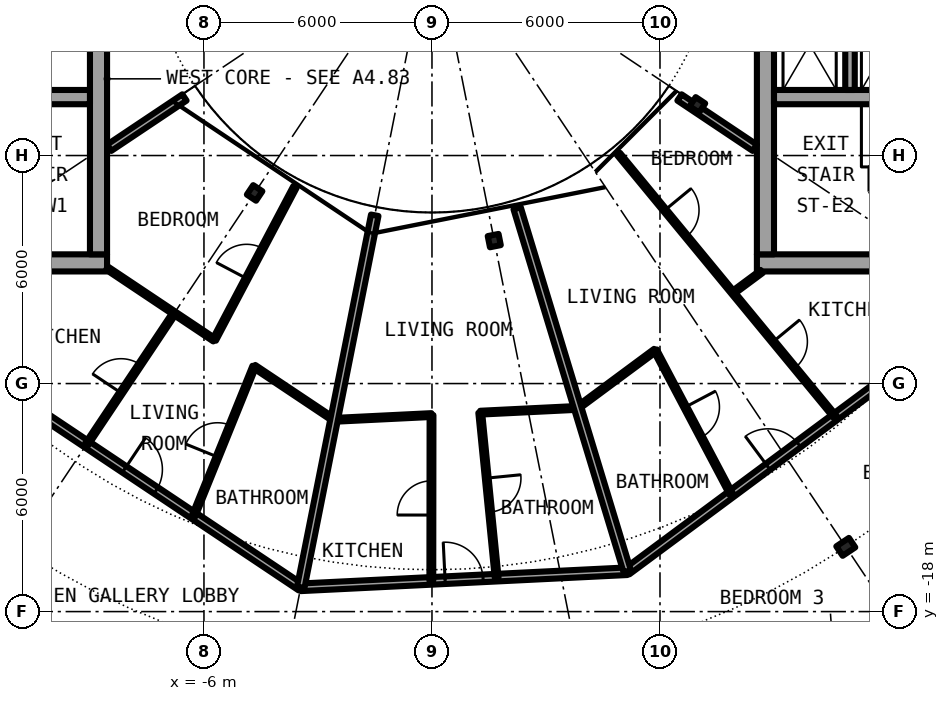
"""IFC4 building model, lengths in metres.
Left out: names, types, materials, properties, quantities, classifications, styles, units other than length and angle.
Written with IfcOpenShell. Run it as: python <this file> out.ifc"""

import sys

from ifc_helpers import new_model, si_unit, direction, frame, frame_2d, origin, origin_2d, place, context, subcontext, project, spatial, rectangle, i_section, extrude, element, fill, save


model = new_model("IFC4")
c1 = context("Model", 3, precision=1e-05, world=origin(), true_north=direction((0.0, 1.0)))
c2 = subcontext(c1, "Body", "Model", "MODEL_VIEW")
j1 = project(units=[si_unit("LENGTHUNIT", "METRE"), si_unit("PLANEANGLEUNIT", "RADIAN")], contexts=[c1])
p1 = place(None, origin())
s1 = spatial("IfcSite", under=j1, at=p1, CompositionType="ELEMENT")
p2 = place(p1, origin())
s2 = spatial("IfcBuilding", under=s1, at=p2, CompositionType="ELEMENT")
p3 = place(p2, frame((0.0, 0.0, 190.2)))
s3 = spatial("IfcBuildingStorey", under=s2, at=p3, CompositionType="ELEMENT", Elevation=190.2)
p4 = place(p3, frame((10.889, -16.297, 0.0), z_axis=(0.0, 0.0, 1.0), x_axis=(0.55557023302, -0.831469612303, 0.0)))
e1 = element("IfcColumn", 1, at=p4, inside=s3, PredefinedType="COLUMN", context=c2, shape_type="SweptSolid", body=[
    extrude(i_section(OverallWidth=0.3, OverallDepth=0.4, WebThickness=0.013, FlangeThickness=0.024, FilletRadius=0.027, at=origin_2d()), origin(), (0.0, 0.0, 1.0), 3.05),
])
for number, where, z_axis, x_axis in (
    (2, (-4.667, -6.984, 0.0), (0.0, 0.0, 1.0), (-0.556, -0.831, 0.0)),
    (3, (1.639, -8.239, 0.0), (0.0, 0.0, 1.0), (0.195, -0.981, 0.0)),
    (4, (6.984, -4.667, 0.0), (0.0, 0.0, 1.0), (0.831, -0.556, 0.0)),
):
    element("IfcColumn", number, at=place(p3, frame(where, z_axis=z_axis, x_axis=x_axis)), inside=s3, PredefinedType="COLUMN", context=c2, shape_type="SweptSolid", body=[
        extrude(i_section(OverallWidth=0.3, OverallDepth=0.29, WebThickness=0.009, FlangeThickness=0.014, FilletRadius=0.027, at=origin_2d()), origin(), (0.0, 0.0, 1.0), 3.05),
    ])
p5 = place(p3, frame((8.55, -8.825, 0.0), z_axis=(0.0, 0.0, 1.0), x_axis=(1.0, 0.0, 0.0)))
e5 = element("IfcWall", 5, at=p5, inside=s3, PredefinedType="SHEAR", context=c2, shape_type="SweptSolid", body=[
    extrude(rectangle(XDim=13.5, YDim=0.45, at=frame_2d((6.75, 0.0))), origin(), (0.0, 0.0, 1.0), 3.05),
])
p6 = place(p5, frame((11.325, 0.0, 0.0)))
e6 = element("IfcOpeningElement", 6, at=p6, cuts=e5, PredefinedType="OPENING", context=c2, shape_type="SweptSolid", body=[
    extrude(rectangle(XDim=1.2, YDim=2.3, at=frame_2d((0.6, 1.15))), frame((0.0, 0.235, 0.0), z_axis=(0.0, -1.0, 0.0), x_axis=(1.0, 0.0, 0.0)), (0.0, 0.0, 1.0), 0.47),
])
p7 = place(p3, frame((8.775, -8.6, 0.0), z_axis=(0.0, 0.0, 1.0), x_axis=(0.0, 1.0, 0.0)))
e7 = element("IfcWall", 7, at=p7, inside=s3, PredefinedType="SHEAR", context=c2, shape_type="SweptSolid", body=[
    extrude(rectangle(XDim=17.2, YDim=0.45, at=frame_2d((8.6, 0.0))), origin(), (0.0, 0.0, 1.0), 3.05),
])
p8 = place(p7, frame((7.4, 0.0, 0.1)))
e8 = element("IfcOpeningElement", 8, at=p8, cuts=e7, PredefinedType="OPENING", context=c2, shape_type="SweptSolid", body=[
    extrude(rectangle(XDim=2.4, YDim=2.2, at=frame_2d((1.2, 1.1))), frame((0.0, 0.235, 0.0), z_axis=(0.0, -1.0, 0.0), x_axis=(1.0, 0.0, 0.0)), (0.0, 0.0, 1.0), 0.47),
])
p9 = place(p3, frame((9.0, -4.462, 0.0), z_axis=(0.0, 0.0, 1.0), x_axis=(1.0, 0.0, 0.0)))
e9 = element("IfcWall", 9, at=p9, inside=s3, PredefinedType="SHEAR", context=c2, shape_type="SweptSolid", body=[
    extrude(rectangle(XDim=10.15, YDim=0.375, at=frame_2d((5.075, 0.0))), origin(), (0.0, 0.0, 1.0), 3.05),
])
p10 = place(p3, frame((11.0, -1.825, 0.0), z_axis=(0.0, 0.0, 1.0), x_axis=(0.0, -1.0, 0.0)))
e10 = element("IfcWall", 10, at=p10, inside=s3, PredefinedType="SOLIDWALL", context=c2, shape_type="SweptSolid", body=[
    extrude(rectangle(XDim=2.45, YDim=0.25, at=frame_2d((1.225, 0.0))), origin(), (0.0, 0.0, 1.0), 2.7),
])
p11 = place(p3, frame((-22.05, -8.825, 0.0), z_axis=(0.0, 0.0, 1.0), x_axis=(1.0, 0.0, 0.0)))
e11 = element("IfcWall", 11, at=p11, inside=s3, PredefinedType="SHEAR", context=c2, shape_type="SweptSolid", body=[
    extrude(rectangle(XDim=13.5, YDim=0.45, at=frame_2d((6.75, 0.0))), origin(), (0.0, 0.0, 1.0), 3.05),
])
p12 = place(p11, frame((0.975, 0.0, 0.0)))
e12 = element("IfcOpeningElement", 12, at=p12, cuts=e11, PredefinedType="OPENING", context=c2, shape_type="SweptSolid", body=[
    extrude(rectangle(XDim=1.2, YDim=2.3, at=frame_2d((0.6, 1.15))), frame((0.0, 0.235, 0.0), z_axis=(0.0, -1.0, 0.0), x_axis=(1.0, 0.0, 0.0)), (0.0, 0.0, 1.0), 0.47),
])
p13 = place(p3, frame((-8.775, 8.6, 0.0), z_axis=(0.0, 0.0, 1.0), x_axis=(0.0, -1.0, 0.0)))
e13 = element("IfcWall", 13, at=p13, inside=s3, PredefinedType="SHEAR", context=c2, shape_type="SweptSolid", body=[
    extrude(rectangle(XDim=17.2, YDim=0.45, at=frame_2d((8.6, 0.0))), origin(), (0.0, 0.0, 1.0), 3.05),
])
p14 = place(p13, frame((7.4, 0.0, 0.1)))
e14 = element("IfcOpeningElement", 14, at=p14, cuts=e13, PredefinedType="OPENING", context=c2, shape_type="SweptSolid", body=[
    extrude(rectangle(XDim=2.4, YDim=2.2, at=frame_2d((1.2, 1.1))), frame((0.0, 0.235, 0.0), z_axis=(0.0, -1.0, 0.0), x_axis=(1.0, 0.0, 0.0)), (0.0, 0.0, 1.0), 0.47),
])
p15 = place(p3, frame((-9.0, -4.462, 0.0), z_axis=(0.0, 0.0, 1.0), x_axis=(-1.0, 0.0, 0.0)))
e15 = element("IfcWall", 15, at=p15, inside=s3, PredefinedType="SHEAR", context=c2, shape_type="SweptSolid", body=[
    extrude(rectangle(XDim=10.15, YDim=0.375, at=frame_2d((5.075, 0.0))), origin(), (0.0, 0.0, 1.0), 3.05),
])
p16 = place(p15, frame((6.6, 0.0, 0.0)))
e16 = element("IfcOpeningElement", 16, at=p16, cuts=e15, PredefinedType="OPENING", context=c2, shape_type="SweptSolid", body=[
    extrude(rectangle(XDim=1.1, YDim=2.3, at=frame_2d((0.55, 1.15))), frame((0.0, 0.198, 0.0), z_axis=(0.0, -1.0, 0.0), x_axis=(1.0, 0.0, 0.0)), (0.0, 0.0, 1.0), 0.395),
])
p17 = place(p3, frame((11.266, -21.078, 0.0), z_axis=(0.0, 0.0, 1.0), x_axis=(0.741084540886, 0.671411724101, 0.0)))
e17 = element("IfcWall", 17, at=p17, inside=s3, PredefinedType="PARTITIONING", context=c2, shape_type="SweptSolid", body=[
    extrude(rectangle(XDim=6.963, YDim=0.1, at=frame_2d((3.481, 0.0))), origin(), (0.0, 0.0, 1.0), 2.7),
])
p18 = place(p17, frame((3.035, 0.0, 0.0)))
e18 = element("IfcOpeningElement", 18, at=p18, cuts=e17, PredefinedType="OPENING", context=c2, shape_type="SweptSolid", body=[
    extrude(rectangle(XDim=0.9, YDim=2.3, at=frame_2d((0.45, 1.15))), frame((0.0, 0.06, 0.0), z_axis=(0.0, -1.0, 0.0), x_axis=(1.0, 0.0, 0.0)), (0.0, 0.0, 1.0), 0.12),
])
p19 = place(p3, frame((10.51, -19.669, 0.0), z_axis=(0.0, 0.0, 1.0), x_axis=(0.74093897184, 0.671572363941, 0.0)))
e19 = element("IfcWall", 19, at=p19, inside=s3, PredefinedType="PARTITIONING", context=c2, shape_type="SweptSolid", body=[
    extrude(rectangle(XDim=10.84, YDim=0.2, at=frame_2d((5.42, 0.0))), origin(), (0.0, 0.0, 1.0), 2.7),
])
p20 = place(p19, frame((4.922, 0.0, 0.0)))
e20 = element("IfcOpeningElement", 20, at=p20, cuts=e19, PredefinedType="OPENING", context=c2, shape_type="SweptSolid", body=[
    extrude(rectangle(XDim=1.0, YDim=2.3, at=frame_2d((0.5, 1.15))), frame((0.0, 0.11, 0.0), z_axis=(0.0, -1.0, 0.0), x_axis=(1.0, 0.0, 0.0)), (0.0, 0.0, 1.0), 0.22),
])
p21 = place(p3, frame((-3.453, -17.361, 0.0), z_axis=(0.0, 0.0, 1.0), x_axis=(0.998789433108, 0.049190124121, 0.0)))
e21 = element("IfcWall", 21, at=p21, inside=s3, PredefinedType="PARTITIONING", context=c2, shape_type="SweptSolid", body=[
    extrude(rectangle(XDim=8.601, YDim=0.2, at=frame_2d((4.301, 0.0))), origin(), (0.0, 0.0, 1.0), 2.7),
])
p22 = place(p21, frame((3.803, 0.0, 0.0)))
e22 = element("IfcOpeningElement", 22, at=p22, cuts=e21, PredefinedType="OPENING", context=c2, shape_type="SweptSolid", body=[
    extrude(rectangle(XDim=1.0, YDim=2.3, at=frame_2d((0.5, 1.15))), frame((0.0, 0.11, 0.0), z_axis=(0.0, -1.0, 0.0), x_axis=(1.0, 0.0, 0.0)), (0.0, 0.0, 1.0), 0.22),
])
p23 = place(p3, frame((5.137, -16.938, 0.0), z_axis=(0.0, 0.0, 1.0), x_axis=(0.803240181354, 0.595655278712, 0.0)))
e23 = element("IfcWall", 23, at=p23, inside=s3, PredefinedType="PARTITIONING", context=c2, shape_type="SweptSolid", body=[
    extrude(rectangle(XDim=11.928, YDim=0.2, at=frame_2d((5.964, 0.0))), origin(), (0.0, 0.0, 1.0), 2.7),
])
p24 = place(p23, frame((4.612, 0.0, 0.0)))
e24 = element("IfcOpeningElement", 24, at=p24, cuts=e23, PredefinedType="OPENING", context=c2, shape_type="SweptSolid", body=[
    extrude(rectangle(XDim=1.0, YDim=2.3, at=frame_2d((0.5, 1.15))), frame((0.0, 0.11, 0.0), z_axis=(0.0, -1.0, 0.0), x_axis=(1.0, 0.0, 0.0)), (0.0, 0.0, 1.0), 0.22),
])
p25 = place(p3, frame((-14.717, -9.834, 0.0), z_axis=(0.0, 0.0, 1.0), x_axis=(0.831492679744, -0.555535708603, 0.0)))
e25 = element("IfcWall", 25, at=p25, inside=s3, PredefinedType="PARTITIONING", context=c2, shape_type="SweptSolid", body=[
    extrude(rectangle(XDim=13.549, YDim=0.2, at=frame_2d((6.775, 0.0))), origin(), (0.0, 0.0, 1.0), 2.7),
])
p26 = place(p25, frame((7.966, 0.0, 0.0)))
e26 = element("IfcOpeningElement", 26, at=p26, cuts=e25, PredefinedType="OPENING", context=c2, shape_type="SweptSolid", body=[
    extrude(rectangle(XDim=1.0, YDim=2.3, at=frame_2d((0.5, 1.15))), frame((0.0, 0.11, 0.0), z_axis=(0.0, -1.0, 0.0), x_axis=(1.0, 0.0, 0.0)), (0.0, 0.0, 1.0), 0.22),
])
p27 = place(p3, frame((-2.577, -12.955, 0.0), z_axis=(0.0, 0.0, 1.0), x_axis=(0.998796046378, 0.049055659616, 0.0)))
e27 = element("IfcWall", 27, at=p27, inside=s3, PredefinedType="PARTITIONING", context=c2, shape_type="SweptSolid", body=[
    extrude(rectangle(XDim=2.568, YDim=0.1, at=frame_2d((1.284, 0.0))), origin(), (0.0, 0.0, 1.0), 2.7),
])
p28 = place(p3, frame((1.27, -12.766, 0.0), z_axis=(0.0, 0.0, 1.0), x_axis=(0.998790464653, 0.049169174464, 0.0)))
e28 = element("IfcWall", 28, at=p28, inside=s3, PredefinedType="PARTITIONING", context=c2, shape_type="SweptSolid", body=[
    extrude(rectangle(XDim=2.567, YDim=0.1, at=frame_2d((1.284, 0.0))), origin(), (0.0, 0.0, 1.0), 2.7),
])
p29 = place(p3, frame((3.83, -12.641, 0.0), z_axis=(0.0, 0.0, 1.0), x_axis=(0.803533389313, 0.595259684725, 0.0)))
e29 = element("IfcWall", 29, at=p29, inside=s3, PredefinedType="PARTITIONING", context=c2, shape_type="SweptSolid", body=[
    extrude(rectangle(XDim=2.544, YDim=0.1, at=frame_2d((1.272, 0.0))), origin(), (0.0, 0.0, 1.0), 2.7),
])
p30 = place(p3, frame((7.919, -9.611, 0.0), z_axis=(0.0, 0.0, 1.0), x_axis=(0.803437844371, 0.595388637977, 0.0)))
e30 = element("IfcWall", 30, at=p30, inside=s3, PredefinedType="PARTITIONING", context=c2, shape_type="SweptSolid", body=[
    extrude(rectangle(XDim=0.942, YDim=0.1, at=frame_2d((0.471, 0.0))), origin(), (0.0, 0.0, 1.0), 2.7),
])
p31 = place(p3, frame((-8.549, -8.965, 0.0), z_axis=(0.0, 0.0, 1.0), x_axis=(0.831463102602, -0.555579975352, 0.0)))
e31 = element("IfcWall", 31, at=p31, inside=s3, PredefinedType="PARTITIONING", context=c2, shape_type="SweptSolid", body=[
    extrude(rectangle(XDim=3.393, YDim=0.1, at=frame_2d((1.696, 0.0))), origin(), (0.0, 0.0, 1.0), 2.7),
])
p32 = place(p3, frame((-4.677, -11.552, 0.0), z_axis=(0.0, 0.0, 1.0), x_axis=(0.83155963659, -0.555435478517, 0.0)))
e32 = element("IfcWall", 32, at=p32, inside=s3, PredefinedType="PARTITIONING", context=c2, shape_type="SweptSolid", body=[
    extrude(rectangle(XDim=2.528, YDim=0.1, at=frame_2d((1.264, 0.0))), origin(), (0.0, 0.0, 1.0), 2.7),
])
for number, where, z_axis, x_axis in (
    (33, (-6.513, -4.472, 0.0), (0.0, 0.0, 1.0), (-0.831, -0.556, 0.0)),
    (34, (6.513, -4.472, 0.0), (0.0, 0.0, 1.0), (0.831, -0.556, 0.0)),
):
    element("IfcWall", number, at=place(p3, frame(where, z_axis=z_axis, x_axis=x_axis)), inside=s3, PredefinedType="PARTITIONING", context=c2, shape_type="SweptSolid", body=[
        extrude(rectangle(XDim=2.383, YDim=0.2, at=frame_2d((1.191, 0.0))), origin(), (0.0, 0.0, 1.0), 2.7),
    ])
p33 = place(p3, frame((-9.085, -13.597, 0.0), z_axis=(0.0, 0.0, 1.0), x_axis=(0.555528237031, 0.831497671591, 0.0)))
e35 = element("IfcWall", 35, at=p33, inside=s3, PredefinedType="PARTITIONING", context=c2, shape_type="SweptSolid", body=[
    extrude(rectangle(XDim=4.149, YDim=0.1, at=frame_2d((2.075, 0.0))), origin(), (0.0, 0.0, 1.0), 2.7),
])
p34 = place(p33, frame((1.625, 0.0, 0.0)))
e36 = element("IfcOpeningElement", 36, at=p34, cuts=e35, PredefinedType="OPENING", context=c2, shape_type="SweptSolid", body=[
    extrude(rectangle(XDim=0.9, YDim=2.3, at=frame_2d((0.45, 1.15))), frame((0.0, 0.06, 0.0), z_axis=(0.0, -1.0, 0.0), x_axis=(1.0, 0.0, 0.0)), (0.0, 0.0, 1.0), 0.12),
])
p35 = place(p3, frame((-6.269, -15.478, 0.0), z_axis=(0.0, 0.0, 1.0), x_axis=(0.375509828455, 0.926818411952, 0.0)))
e37 = element("IfcWall", 37, at=p35, inside=s3, PredefinedType="PARTITIONING", context=c2, shape_type="SweptSolid", body=[
    extrude(rectangle(XDim=4.237, YDim=0.1, at=frame_2d((2.119, 0.0))), origin(), (0.0, 0.0, 1.0), 2.7),
])
p36 = place(p35, frame((1.669, 0.0, 0.0)))
e38 = element("IfcOpeningElement", 38, at=p36, cuts=e37, PredefinedType="OPENING", context=c2, shape_type="SweptSolid", body=[
    extrude(rectangle(XDim=0.9, YDim=2.3, at=frame_2d((0.45, 1.15))), frame((0.0, 0.06, 0.0), z_axis=(0.0, -1.0, 0.0), x_axis=(1.0, 0.0, 0.0)), (0.0, 0.0, 1.0), 0.12),
])
p37 = place(p3, frame((-5.729, -10.849, 0.0), z_axis=(0.0, 0.0, 1.0), x_axis=(0.466962677975, 0.884277025246, 0.0)))
e39 = element("IfcWall", 39, at=p37, inside=s3, PredefinedType="PARTITIONING", context=c2, shape_type="SweptSolid", body=[
    extrude(rectangle(XDim=4.549, YDim=0.1, at=frame_2d((2.274, 0.0))), origin(), (0.0, 0.0, 1.0), 2.7),
])
p38 = place(p37, frame((1.824, 0.0, 0.0)))
e40 = element("IfcOpeningElement", 40, at=p38, cuts=e39, PredefinedType="OPENING", context=c2, shape_type="SweptSolid", body=[
    extrude(rectangle(XDim=0.9, YDim=2.3, at=frame_2d((0.45, 1.15))), frame((0.0, 0.06, 0.0), z_axis=(0.0, -1.0, 0.0), x_axis=(1.0, 0.0, 0.0)), (0.0, 0.0, 1.0), 0.12),
])
p39 = place(p3, frame((-3.453, -17.36, 0.0), z_axis=(0.0, 0.0, 1.0), x_axis=(0.19507162238, 0.980788999807, 0.0)))
e41 = element("IfcWall", 41, at=p39, inside=s3, PredefinedType="PARTITIONING", context=c2, shape_type="SweptSolid", body=[
    extrude(rectangle(XDim=9.98, YDim=0.2, at=frame_2d((4.99, 0.0))), origin(), (0.0, 0.0, 1.0), 2.7),
])
p40 = place(p3, frame((-0.017, -17.191, 0.0), z_axis=(0.0, 0.0, 1.0), x_axis=(0.001175416181, 0.999999309198, 0.0)))
e42 = element("IfcWall", 42, at=p40, inside=s3, PredefinedType="PARTITIONING", context=c2, shape_type="SweptSolid", body=[
    extrude(rectangle(XDim=4.362, YDim=0.1, at=frame_2d((2.181, 0.0))), origin(), (0.0, 0.0, 1.0), 2.7),
])
p41 = place(p40, frame((1.731, 0.0, 0.0)))
e43 = element("IfcOpeningElement", 43, at=p41, cuts=e42, PredefinedType="OPENING", context=c2, shape_type="SweptSolid", body=[
    extrude(rectangle(XDim=0.9, YDim=2.3, at=frame_2d((0.45, 1.15))), frame((0.0, 0.06, 0.0), z_axis=(0.0, -1.0, 0.0), x_axis=(1.0, 0.0, 0.0)), (0.0, 0.0, 1.0), 0.12),
])
p42 = place(p3, frame((1.27, -12.766, 0.0), z_axis=(0.0, 0.0, 1.0), x_axis=(0.099004993851, -0.9950869365, 0.0)))
e44 = element("IfcWall", 44, at=p42, inside=s3, PredefinedType="PARTITIONING", context=c2, shape_type="SweptSolid", body=[
    extrude(rectangle(XDim=4.362, YDim=0.1, at=frame_2d((2.181, 0.0))), origin(), (0.0, 0.0, 1.0), 2.7),
])
p43 = place(p42, frame((1.731, 0.0, 0.0)))
e45 = element("IfcOpeningElement", 45, at=p43, cuts=e44, PredefinedType="OPENING", context=c2, shape_type="SweptSolid", body=[
    extrude(rectangle(XDim=0.9, YDim=2.3, at=frame_2d((0.45, 1.15))), frame((0.0, 0.06, 0.0), z_axis=(0.0, -1.0, 0.0), x_axis=(1.0, 0.0, 0.0)), (0.0, 0.0, 1.0), 0.12),
])
p44 = place(p3, frame((2.241, -7.388, 0.0), z_axis=(0.0, 0.0, 1.0), x_axis=(0.290284403441, -0.956940418793, 0.0)))
e46 = element("IfcWall", 46, at=p44, inside=s3, PredefinedType="PARTITIONING", context=c2, shape_type="SweptSolid", body=[
    extrude(rectangle(XDim=9.98, YDim=0.2, at=frame_2d((4.99, 0.0))), origin(), (0.0, 0.0, 1.0), 2.7),
])
p45 = place(p3, frame((4.908, -5.959, 0.0), z_axis=(0.0, 0.0, 1.0), x_axis=(0.636115614725, -0.771593756262, 0.0)))
e47 = element("IfcWall", 47, at=p45, inside=s3, PredefinedType="PARTITIONING", context=c2, shape_type="SweptSolid", body=[
    extrude(rectangle(XDim=8.967, YDim=0.1, at=frame_2d((4.483, 0.0))), origin(), (0.0, 0.0, 1.0), 2.7),
])
p46 = place(p45, frame((6.4, 0.0, 0.0)))
e48 = element("IfcOpeningElement", 48, at=p46, cuts=e47, PredefinedType="OPENING", context=c2, shape_type="SweptSolid", body=[
    extrude(rectangle(XDim=0.9, YDim=2.3, at=frame_2d((0.45, 1.15))), frame((0.0, 0.06, 0.0), z_axis=(0.0, -1.0, 0.0), x_axis=(1.0, 0.0, 0.0)), (0.0, 0.0, 1.0), 0.12),
])
p47 = place(p45, frame((1.917, 0.0, 0.0)))
e49 = element("IfcOpeningElement", 49, at=p47, cuts=e47, PredefinedType="OPENING", context=c2, shape_type="SweptSolid", body=[
    extrude(rectangle(XDim=0.9, YDim=2.3, at=frame_2d((0.45, 1.15))), frame((0.0, 0.06, 0.0), z_axis=(0.0, -1.0, 0.0), x_axis=(1.0, 0.0, 0.0)), (0.0, 0.0, 1.0), 0.12),
])
p48 = place(p3, frame((5.876, -11.126, 0.0), z_axis=(0.0, 0.0, 1.0), x_axis=(0.467030118529, -0.884241408432, 0.0)))
e50 = element("IfcWall", 50, at=p48, inside=s3, PredefinedType="PARTITIONING", context=c2, shape_type="SweptSolid", body=[
    extrude(rectangle(XDim=4.278, YDim=0.1, at=frame_2d((2.139, 0.0))), origin(), (0.0, 0.0, 1.0), 2.7),
])
p49 = place(p48, frame((1.689, 0.0, 0.0)))
e51 = element("IfcOpeningElement", 51, at=p49, cuts=e50, PredefinedType="OPENING", context=c2, shape_type="SweptSolid", body=[
    extrude(rectangle(XDim=0.9, YDim=2.3, at=frame_2d((0.45, 1.15))), frame((0.0, 0.06, 0.0), z_axis=(0.0, -1.0, 0.0), x_axis=(1.0, 0.0, 0.0)), (0.0, 0.0, 1.0), 0.12),
])
p50 = place(p26, origin())
e52 = element("IfcDoor", 52, at=p50, inside=s3, OperationType="SINGLE_SWING_RIGHT", PredefinedType="DOOR", context=c2, shape_type="SweptSolid", body=[
    extrude(rectangle(XDim=1.0, YDim=2.3, at=frame_2d((0.5, 1.15))), frame((0.0, 0.025, 0.0), z_axis=(0.0, -1.0, 0.0), x_axis=(1.0, 0.0, 0.0)), (0.0, 0.0, 1.0), 0.05),
])
fill(e26, e52)
p51 = place(p36, origin())
e53 = element("IfcDoor", 53, at=p51, inside=s3, OperationType="SINGLE_SWING_LEFT", PredefinedType="DOOR", context=c2, shape_type="SweptSolid", body=[
    extrude(rectangle(XDim=0.9, YDim=2.3, at=frame_2d((0.45, 1.15))), frame((0.0, 0.025, 0.0), z_axis=(0.0, -1.0, 0.0), x_axis=(1.0, 0.0, 0.0)), (0.0, 0.0, 1.0), 0.05),
])
fill(e38, e53)
p52 = place(p34, origin())
e54 = element("IfcDoor", 54, at=p52, inside=s3, OperationType="SINGLE_SWING_LEFT", PredefinedType="DOOR", context=c2, shape_type="SweptSolid", body=[
    extrude(rectangle(XDim=0.9, YDim=2.3, at=frame_2d((0.45, 1.15))), frame((0.0, 0.025, 0.0), z_axis=(0.0, -1.0, 0.0), x_axis=(1.0, 0.0, 0.0)), (0.0, 0.0, 1.0), 0.05),
])
fill(e36, e54)
p53 = place(p38, origin())
e55 = element("IfcDoor", 55, at=p53, inside=s3, OperationType="SINGLE_SWING_RIGHT", PredefinedType="DOOR", context=c2, shape_type="SweptSolid", body=[
    extrude(rectangle(XDim=0.9, YDim=2.3, at=frame_2d((0.45, 1.15))), frame((0.0, 0.025, 0.0), z_axis=(0.0, -1.0, 0.0), x_axis=(1.0, 0.0, 0.0)), (0.0, 0.0, 1.0), 0.05),
])
fill(e40, e55)
p54 = place(p22, origin())
e56 = element("IfcDoor", 56, at=p54, inside=s3, OperationType="SINGLE_SWING_RIGHT", PredefinedType="DOOR", context=c2, shape_type="SweptSolid", body=[
    extrude(rectangle(XDim=1.0, YDim=2.3, at=frame_2d((0.5, 1.15))), frame((0.0, 0.025, 0.0), z_axis=(0.0, -1.0, 0.0), x_axis=(1.0, 0.0, 0.0)), (0.0, 0.0, 1.0), 0.05),
])
fill(e22, e56)
p55 = place(p43, origin())
e57 = element("IfcDoor", 57, at=p55, inside=s3, OperationType="SINGLE_SWING_LEFT", PredefinedType="DOOR", context=c2, shape_type="SweptSolid", body=[
    extrude(rectangle(XDim=0.9, YDim=2.3, at=frame_2d((0.45, 1.15))), frame((0.0, 0.025, 0.0), z_axis=(0.0, -1.0, 0.0), x_axis=(1.0, 0.0, 0.0)), (0.0, 0.0, 1.0), 0.05),
])
fill(e45, e57)
p56 = place(p41, origin())
e58 = element("IfcDoor", 58, at=p56, inside=s3, OperationType="SINGLE_SWING_LEFT", PredefinedType="DOOR", context=c2, shape_type="SweptSolid", body=[
    extrude(rectangle(XDim=0.9, YDim=2.3, at=frame_2d((0.45, 1.15))), frame((0.0, 0.025, 0.0), z_axis=(0.0, -1.0, 0.0), x_axis=(1.0, 0.0, 0.0)), (0.0, 0.0, 1.0), 0.05),
])
fill(e43, e58)
p57 = place(p24, origin())
e59 = element("IfcDoor", 59, at=p57, inside=s3, OperationType="SINGLE_SWING_LEFT", PredefinedType="DOOR", context=c2, shape_type="SweptSolid", body=[
    extrude(rectangle(XDim=1.0, YDim=2.3, at=frame_2d((0.5, 1.15))), frame((0.0, 0.025, 0.0), z_axis=(0.0, -1.0, 0.0), x_axis=(1.0, 0.0, 0.0)), (0.0, 0.0, 1.0), 0.05),
])
fill(e24, e59)
p58 = place(p49, origin())
e60 = element("IfcDoor", 60, at=p58, inside=s3, OperationType="SINGLE_SWING_LEFT", PredefinedType="DOOR", context=c2, shape_type="SweptSolid", body=[
    extrude(rectangle(XDim=0.9, YDim=2.3, at=frame_2d((0.45, 1.15))), frame((0.0, 0.025, 0.0), z_axis=(0.0, -1.0, 0.0), x_axis=(1.0, 0.0, 0.0)), (0.0, 0.0, 1.0), 0.05),
])
fill(e51, e60)
p59 = place(p46, origin())
e61 = element("IfcDoor", 61, at=p59, inside=s3, OperationType="SINGLE_SWING_RIGHT", PredefinedType="DOOR", context=c2, shape_type="SweptSolid", body=[
    extrude(rectangle(XDim=0.9, YDim=2.3, at=frame_2d((0.45, 1.15))), frame((0.0, 0.025, 0.0), z_axis=(0.0, -1.0, 0.0), x_axis=(1.0, 0.0, 0.0)), (0.0, 0.0, 1.0), 0.05),
])
fill(e48, e61)
p60 = place(p47, origin())
e62 = element("IfcDoor", 62, at=p60, inside=s3, OperationType="SINGLE_SWING_LEFT", PredefinedType="DOOR", context=c2, shape_type="SweptSolid", body=[
    extrude(rectangle(XDim=0.9, YDim=2.3, at=frame_2d((0.45, 1.15))), frame((0.0, 0.025, 0.0), z_axis=(0.0, -1.0, 0.0), x_axis=(1.0, 0.0, 0.0)), (0.0, 0.0, 1.0), 0.05),
])
fill(e49, e62)
save(model, sys.argv[1])
